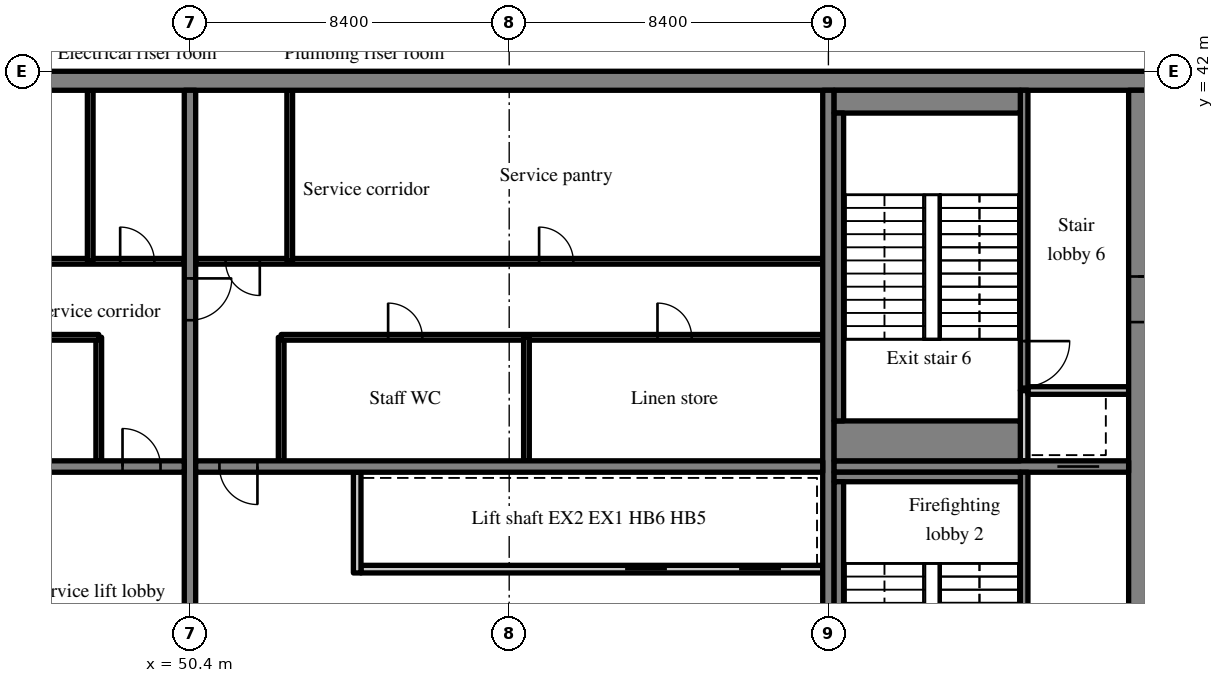
"""IFC4 building model, lengths in metres.
Left out: names, types, materials, properties, quantities, classifications, styles, units other than length and angle.
Written with IfcOpenShell. Run it as: python <this file> out.ifc"""

import sys

from ifc_helpers import new_model, si_unit, direction, frame, frame_2d, origin, place, context, subcontext, project, spatial, rectangle, extrude, source, transform, mapped, element, fill, save


model = new_model("IFC4")
c1 = context("Model", 3, precision=1e-05, world=origin(), true_north=direction((0.0, 1.0)))
c2 = subcontext(c1, "Body", "Model", "MODEL_VIEW")
j1 = project(units=[si_unit("LENGTHUNIT", "METRE"), si_unit("PLANEANGLEUNIT", "RADIAN")], contexts=[c1])
p1 = place(None, origin())
s1 = spatial("IfcSite", under=j1, at=p1, CompositionType="ELEMENT")
p2 = place(p1, origin())
s2 = spatial("IfcBuilding", under=s1, at=p2, CompositionType="ELEMENT")
p3 = place(p2, frame((0.0, 0.0, 281.7)))
s3 = spatial("IfcBuildingStorey", under=s2, at=p3, CompositionType="ELEMENT", Elevation=281.7)
m1 = source(origin(), c2, "Body", "SweptSolid", [
    extrude(rectangle(XDim=50.4, YDim=0.5, at=frame_2d((25.2, 0.0))), origin(), (0.0, 0.0, 1.0), 3.72),
])
p4 = place(p3, frame((25.2, 41.75, 0.0), z_axis=(0.0, 0.0, 1.0), x_axis=(1.0, 0.0, 0.0)))
e1 = element("IfcWall", 1, at=p4, inside=s3, PredefinedType="SHEAR", context=c2, shape_type="MappedRepresentation", body=[
    mapped(m1, transform((0.0, 0.0, 0.0), scale=1.0)),
])
m2 = source(origin(), c2, "Body", "SweptSolid", [
    extrude(rectangle(XDim=19.0, YDim=0.5, at=frame_2d((9.5, 0.0))), origin(), (0.0, 0.0, 1.0), 3.72),
])
p5 = place(p3, frame((75.35, 22.5, 0.0), z_axis=(0.0, 0.0, 1.0), x_axis=(0.0, 1.0, 0.0)))
e2 = element("IfcWall", 2, at=p5, inside=s3, PredefinedType="SHEAR", context=c2, shape_type="MappedRepresentation", body=[
    mapped(m2, transform((0.0, 0.0, 0.0), scale=1.0)),
])
m3 = source(origin(), c2, "Body", "SweptSolid", [
    extrude(rectangle(XDim=1.2, YDim=2.1, at=frame_2d((0.6, 1.05))), frame((0.0, 0.26, 0.0), z_axis=(0.0, -1.0, 0.0), x_axis=(1.0, 0.0, 0.0)), (0.0, 0.0, 1.0), 0.52),
])
p6 = place(p5, frame((12.9, 0.0, 0.0)))
e3 = element("IfcOpeningElement", 3, at=p6, cuts=e2, PredefinedType="OPENING", context=c2, shape_type="MappedRepresentation", body=[
    mapped(m3, transform((0.0, 0.0, 0.0), scale=1.0)),
])
m4 = source(origin(), c2, "Body", "SweptSolid", [
    extrude(rectangle(XDim=19.0, YDim=0.3, at=frame_2d((9.5, 0.0))), origin(), (0.0, 0.0, 1.0), 3.72),
])
p7 = place(p3, frame((50.4, 22.5, 0.0), z_axis=(0.0, 0.0, 1.0), x_axis=(0.0, 1.0, 0.0)))
e4 = element("IfcWall", 4, at=p7, inside=s3, PredefinedType="SHEAR", context=c2, shape_type="MappedRepresentation", body=[
    mapped(m4, transform((0.0, 0.0, 0.0), scale=1.0)),
])
m5 = source(origin(), c2, "Body", "SweptSolid", [
    extrude(rectangle(XDim=1.1, YDim=2.1, at=frame_2d((0.55, 1.05))), frame((0.0, 0.16, 0.0), z_axis=(0.0, -1.0, 0.0), x_axis=(1.0, 0.0, 0.0)), (0.0, 0.0, 1.0), 0.32),
])
p8 = place(p7, frame((12.95, 0.0, 0.0)))
e5 = element("IfcOpeningElement", 5, at=p8, cuts=e4, PredefinedType="OPENING", context=c2, shape_type="MappedRepresentation", body=[
    mapped(m5, transform((0.0, 0.0, 0.0), scale=1.0)),
])
p9 = place(p3, frame((67.2, 22.5, 0.0), z_axis=(0.0, 0.0, 1.0), x_axis=(0.0, 1.0, 0.0)))
e6 = element("IfcWall", 6, at=p9, inside=s3, PredefinedType="SHEAR", context=c2, shape_type="MappedRepresentation", body=[
    mapped(m4, transform((0.0, 0.0, 0.0), scale=1.0)),
])
m6 = source(origin(), c2, "Body", "SweptSolid", [
    extrude(rectangle(XDim=16.5, YDim=0.3, at=frame_2d((8.25, 0.0))), origin(), (0.0, 0.0, 1.0), 3.72),
])
p10 = place(p3, frame((33.75, 31.6, 0.0), z_axis=(0.0, 0.0, 1.0), x_axis=(1.0, 0.0, 0.0)))
e7 = element("IfcWall", 7, at=p10, inside=s3, PredefinedType="SHEAR", context=c2, shape_type="MappedRepresentation", body=[
    mapped(m6, transform((0.0, 0.0, 0.0), scale=1.0)),
])
m7 = source(origin(), c2, "Body", "SweptSolid", [
    extrude(rectangle(XDim=1.0, YDim=2.1, at=frame_2d((0.5, 1.05))), frame((0.0, 0.16, 0.0), z_axis=(0.0, -1.0, 0.0), x_axis=(1.0, 0.0, 0.0)), (0.0, 0.0, 1.0), 0.32),
])
p11 = place(p10, frame((14.875, 0.0, 0.0)))
e8 = element("IfcOpeningElement", 8, at=p11, cuts=e7, PredefinedType="OPENING", context=c2, shape_type="MappedRepresentation", body=[
    mapped(m7, transform((0.0, 0.0, 0.0), scale=1.0)),
])
p12 = place(p3, frame((50.55, 31.6, 0.0), z_axis=(0.0, 0.0, 1.0), x_axis=(1.0, 0.0, 0.0)))
e9 = element("IfcWall", 9, at=p12, inside=s3, PredefinedType="SHEAR", context=c2, shape_type="MappedRepresentation", body=[
    mapped(m6, transform((0.0, 0.0, 0.0), scale=1.0)),
])
p13 = place(p12, frame((0.625, 0.0, 0.0)))
e10 = element("IfcOpeningElement", 10, at=p13, cuts=e9, PredefinedType="OPENING", context=c2, shape_type="MappedRepresentation", body=[
    mapped(m7, transform((0.0, 0.0, 0.0), scale=1.0)),
])
m8 = source(origin(), c2, "Body", "SweptSolid", [
    extrude(rectangle(XDim=7.75, YDim=0.3, at=frame_2d((3.875, 0.0))), origin(), (0.0, 0.0, 1.0), 3.72),
])
p14 = place(p3, frame((67.35, 31.6, 0.0), z_axis=(0.0, 0.0, 1.0), x_axis=(1.0, 0.0, 0.0)))
e11 = element("IfcWall", 11, at=p14, inside=s3, PredefinedType="SHEAR", context=c2, shape_type="MappedRepresentation", body=[
    mapped(m8, transform((0.0, 0.0, 0.0), scale=1.0)),
])
p15 = place(p14, frame((5.875, 0.0, 0.0)))
e12 = element("IfcOpeningElement", 12, at=p15, cuts=e11, PredefinedType="OPENING", context=c2, shape_type="MappedRepresentation", body=[
    mapped(m5, transform((0.0, 0.0, 0.0), scale=1.0)),
])
m9 = source(origin(), c2, "Body", "SweptSolid", [
    extrude(rectangle(XDim=3.559, YDim=0.3, at=frame_2d((1.78, 0.0))), origin(), (0.0, 0.0, 1.0), 3.72),
])
p16 = place(p3, frame((76.523, 43.292, 0.0), z_axis=(0.0, 0.0, 1.0), x_axis=(-0.35779745313, -0.933799219604, 0.0)))
e13 = element("IfcWall", 13, at=p16, inside=s3, PredefinedType="SOLIDWALL", context=c2, shape_type="MappedRepresentation", body=[
    mapped(m9, transform((0.0, 0.0, 0.0), scale=1.0)),
])
m10 = source(origin(), c2, "Body", "SweptSolid", [
    extrude(rectangle(XDim=1.5, YDim=2.0, at=frame_2d((0.75, 1.0))), frame((0.0, 0.16, 0.0), z_axis=(0.0, -1.0, 0.0), x_axis=(1.0, 0.0, 0.0)), (0.0, 0.0, 1.0), 0.32),
])
p17 = place(p16, frame((0.156, 0.0, 0.9)))
e14 = element("IfcOpeningElement", 14, at=p17, cuts=e13, PredefinedType="OPENING", context=c2, shape_type="MappedRepresentation", body=[
    mapped(m10, transform((0.0, 0.0, 0.0), scale=1.0)),
])
m11 = source(origin(), c2, "Body", "SweptSolid", [
    extrude(rectangle(XDim=3.25, YDim=0.15, at=frame_2d((1.625, 0.0))), origin(), (0.0, 0.0, 1.0), 3.72),
])
p18 = place(p3, frame((48.0, 31.75, 0.0), z_axis=(0.0, 0.0, 1.0), x_axis=(0.0, 1.0, 0.0)))
e15 = element("IfcWall", 15, at=p18, inside=s3, PredefinedType="PARTITIONING", context=c2, shape_type="MappedRepresentation", body=[
    mapped(m11, transform((0.0, 0.0, 0.0), scale=1.0)),
])
m12 = source(origin(), c2, "Body", "SweptSolid", [
    extrude(rectangle(XDim=14.25, YDim=0.15, at=frame_2d((7.125, 0.0))), origin(), (0.0, 0.0, 1.0), 3.72),
])
p19 = place(p3, frame((33.75, 35.0, 0.0), z_axis=(0.0, 0.0, 1.0), x_axis=(1.0, 0.0, 0.0)))
e16 = element("IfcWall", 16, at=p19, inside=s3, PredefinedType="PARTITIONING", context=c2, shape_type="MappedRepresentation", body=[
    mapped(m12, transform((0.0, 0.0, 0.0), scale=1.0)),
])
m13 = source(origin(), c2, "Body", "SweptSolid", [
    extrude(rectangle(XDim=0.9, YDim=2.1, at=frame_2d((0.45, 1.05))), frame((0.0, 0.085, 0.0), z_axis=(0.0, -1.0, 0.0), x_axis=(1.0, 0.0, 0.0)), (0.0, 0.0, 1.0), 0.17),
])
p20 = place(p19, frame((6.637, 0.0, 0.0)))
e17 = element("IfcOpeningElement", 17, at=p20, cuts=e16, PredefinedType="OPENING", context=c2, shape_type="MappedRepresentation", body=[
    mapped(m13, transform((0.0, 0.0, 0.0), scale=1.0)),
])
m14 = source(origin(), c2, "Body", "SweptSolid", [
    extrude(rectangle(XDim=16.5, YDim=0.15, at=frame_2d((8.25, 0.0))), origin(), (0.0, 0.0, 1.0), 3.72),
])
p21 = place(p3, frame((33.75, 37.0, 0.0), z_axis=(0.0, 0.0, 1.0), x_axis=(1.0, 0.0, 0.0)))
e18 = element("IfcWall", 18, at=p21, inside=s3, PredefinedType="PARTITIONING", context=c2, shape_type="MappedRepresentation", body=[
    mapped(m14, transform((0.0, 0.0, 0.0), scale=1.0)),
])
p22 = place(p21, frame((0.787, 0.0, 0.0)))
e19 = element("IfcOpeningElement", 19, at=p22, cuts=e18, PredefinedType="OPENING", context=c2, shape_type="MappedRepresentation", body=[
    mapped(m13, transform((0.0, 0.0, 0.0), scale=1.0)),
])
p23 = place(p21, frame((3.675, 0.0, 0.0)))
e20 = element("IfcOpeningElement", 20, at=p23, cuts=e18, PredefinedType="OPENING", context=c2, shape_type="MappedRepresentation", body=[
    mapped(m13, transform((0.0, 0.0, 0.0), scale=1.0)),
])
p24 = place(p21, frame((9.45, 0.0, 0.0)))
e21 = element("IfcOpeningElement", 21, at=p24, cuts=e18, PredefinedType="OPENING", context=c2, shape_type="MappedRepresentation", body=[
    mapped(m13, transform((0.0, 0.0, 0.0), scale=1.0)),
])
p25 = place(p21, frame((14.813, 0.0, 0.0)))
e22 = element("IfcOpeningElement", 22, at=p25, cuts=e18, PredefinedType="OPENING", context=c2, shape_type="MappedRepresentation", body=[
    mapped(m13, transform((0.0, 0.0, 0.0), scale=1.0)),
])
m15 = source(origin(), c2, "Body", "SweptSolid", [
    extrude(rectangle(XDim=4.5, YDim=0.15, at=frame_2d((2.25, 0.0))), origin(), (0.0, 0.0, 1.0), 3.72),
])
p26 = place(p3, frame((47.775, 37.0, 0.0), z_axis=(0.0, 0.0, 1.0), x_axis=(0.0, 1.0, 0.0)))
e23 = element("IfcWall", 23, at=p26, inside=s3, PredefinedType="PARTITIONING", context=c2, shape_type="MappedRepresentation", body=[
    mapped(m15, transform((0.0, 0.0, 0.0), scale=1.0)),
])
m16 = source(origin(), c2, "Body", "SweptSolid", [
    extrude(rectangle(XDim=12.15, YDim=0.2, at=frame_2d((6.075, 0.0))), origin(), (0.0, 0.0, 1.0), 3.72),
])
p27 = place(p3, frame((67.05, 28.9, 0.0), z_axis=(0.0, 0.0, 1.0), x_axis=(-1.0, 0.0, 0.0)))
e24 = element("IfcWall", 24, at=p27, inside=s3, PredefinedType="SOLIDWALL", context=c2, shape_type="MappedRepresentation", body=[
    mapped(m16, transform((0.0, 0.0, 0.0), scale=1.0)),
])
m17 = source(origin(), c2, "Body", "SweptSolid", [
    extrude(rectangle(XDim=1.1, YDim=2.1, at=frame_2d((0.55, 1.05))), frame((0.0, 0.11, 0.0), z_axis=(0.0, -1.0, 0.0), x_axis=(1.0, 0.0, 0.0)), (0.0, 0.0, 1.0), 0.22),
])
p28 = place(p27, frame((1.1, 0.0, 0.0)))
e25 = element("IfcOpeningElement", 25, at=p28, cuts=e24, PredefinedType="OPENING", context=c2, shape_type="MappedRepresentation", body=[
    mapped(m17, transform((0.0, 0.0, 0.0), scale=1.0)),
])
p29 = place(p27, frame((4.1, 0.0, 0.0)))
e26 = element("IfcOpeningElement", 26, at=p29, cuts=e24, PredefinedType="OPENING", context=c2, shape_type="MappedRepresentation", body=[
    mapped(m17, transform((0.0, 0.0, 0.0), scale=1.0)),
])
m18 = source(origin(), c2, "Body", "SweptSolid", [
    extrude(rectangle(XDim=2.65, YDim=0.2, at=frame_2d((1.325, 0.0))), origin(), (0.0, 0.0, 1.0), 3.72),
])
p30 = place(p3, frame((54.8, 28.8, 0.0), z_axis=(0.0, 0.0, 1.0), x_axis=(0.0, 1.0, 0.0)))
e27 = element("IfcWall", 27, at=p30, inside=s3, PredefinedType="SOLIDWALL", context=c2, shape_type="MappedRepresentation", body=[
    mapped(m18, transform((0.0, 0.0, 0.0), scale=1.0)),
])
p31 = place(p3, frame((52.8, 31.75, 0.0), z_axis=(0.0, 0.0, 1.0), x_axis=(0.0, 1.0, 0.0)))
e28 = element("IfcWall", 28, at=p31, inside=s3, PredefinedType="PARTITIONING", context=c2, shape_type="MappedRepresentation", body=[
    mapped(m11, transform((0.0, 0.0, 0.0), scale=1.0)),
])
p32 = place(p3, frame((67.05, 35.0, 0.0), z_axis=(0.0, 0.0, 1.0), x_axis=(-1.0, 0.0, 0.0)))
e29 = element("IfcWall", 29, at=p32, inside=s3, PredefinedType="PARTITIONING", context=c2, shape_type="MappedRepresentation", body=[
    mapped(m12, transform((0.0, 0.0, 0.0), scale=1.0)),
])
p33 = place(p32, frame((3.448, 0.0, 0.0)))
e30 = element("IfcOpeningElement", 30, at=p33, cuts=e29, PredefinedType="OPENING", context=c2, shape_type="MappedRepresentation", body=[
    mapped(m13, transform((0.0, 0.0, 0.0), scale=1.0)),
])
p34 = place(p32, frame((10.536, 0.0, 0.0)))
e31 = element("IfcOpeningElement", 31, at=p34, cuts=e29, PredefinedType="OPENING", context=c2, shape_type="MappedRepresentation", body=[
    mapped(m13, transform((0.0, 0.0, 0.0), scale=1.0)),
])
p35 = place(p3, frame((67.05, 37.0, 0.0), z_axis=(0.0, 0.0, 1.0), x_axis=(-1.0, 0.0, 0.0)))
e32 = element("IfcWall", 32, at=p35, inside=s3, PredefinedType="PARTITIONING", context=c2, shape_type="MappedRepresentation", body=[
    mapped(m14, transform((0.0, 0.0, 0.0), scale=1.0)),
])
p36 = place(p35, frame((6.563, 0.0, 0.0)))
e33 = element("IfcOpeningElement", 33, at=p36, cuts=e32, PredefinedType="OPENING", context=c2, shape_type="MappedRepresentation", body=[
    mapped(m13, transform((0.0, 0.0, 0.0), scale=1.0)),
])
p37 = place(p35, frame((14.813, 0.0, 0.0)))
e34 = element("IfcOpeningElement", 34, at=p37, cuts=e32, PredefinedType="OPENING", context=c2, shape_type="MappedRepresentation", body=[
    mapped(m13, transform((0.0, 0.0, 0.0), scale=1.0)),
])
p38 = place(p3, frame((59.254, 31.75, 0.0), z_axis=(0.0, 0.0, 1.0), x_axis=(0.0, 1.0, 0.0)))
e35 = element("IfcWall", 35, at=p38, inside=s3, PredefinedType="PARTITIONING", context=c2, shape_type="MappedRepresentation", body=[
    mapped(m11, transform((0.0, 0.0, 0.0), scale=1.0)),
])
p39 = place(p3, frame((53.025, 37.0, 0.0), z_axis=(0.0, 0.0, 1.0), x_axis=(0.0, 1.0, 0.0)))
e36 = element("IfcWall", 36, at=p39, inside=s3, PredefinedType="PARTITIONING", context=c2, shape_type="MappedRepresentation", body=[
    mapped(m15, transform((0.0, 0.0, 0.0), scale=1.0)),
])
m19 = source(origin(), c2, "Body", "SweptSolid", [
    extrude(rectangle(XDim=8.95, YDim=0.2, at=frame_2d((4.475, 0.0))), origin(), (0.0, 0.0, 1.0), 3.72),
])
p40 = place(p3, frame((72.35, 22.5, 0.0), z_axis=(0.0, 0.0, 1.0), x_axis=(0.0, 1.0, 0.0)))
e37 = element("IfcWall", 37, at=p40, inside=s3, PredefinedType="SOLIDWALL", context=c2, shape_type="MappedRepresentation", body=[
    mapped(m19, transform((0.0, 0.0, 0.0), scale=1.0)),
])
m20 = source(origin(), c2, "Body", "SweptSolid", [
    extrude(rectangle(XDim=1.2, YDim=2.1, at=frame_2d((0.6, 1.05))), frame((0.0, 0.11, 0.0), z_axis=(0.0, -1.0, 0.0), x_axis=(1.0, 0.0, 0.0)), (0.0, 0.0, 1.0), 0.22),
])
p41 = place(p40, frame((1.1, 0.0, 0.0)))
e38 = element("IfcOpeningElement", 38, at=p41, cuts=e37, PredefinedType="OPENING", context=c2, shape_type="MappedRepresentation", body=[
    mapped(m20, transform((0.0, 0.0, 0.0), scale=1.0)),
])
m21 = source(origin(), c2, "Body", "SweptSolid", [
    extrude(rectangle(XDim=1.85, YDim=0.2, at=frame_2d((0.925, 0.0))), origin(), (0.0, 0.0, 1.0), 3.72),
])
p42 = place(p3, frame((72.35, 31.75, 0.0), z_axis=(0.0, 0.0, 1.0), x_axis=(0.0, 1.0, 0.0)))
e39 = element("IfcWall", 39, at=p42, inside=s3, PredefinedType="SOLIDWALL", context=c2, shape_type="MappedRepresentation", body=[
    mapped(m21, transform((0.0, 0.0, 0.0), scale=1.0)),
])
m22 = source(origin(), c2, "Body", "SweptSolid", [
    extrude(rectangle(XDim=2.65, YDim=0.2, at=frame_2d((1.325, 0.0))), origin(), (0.0, 0.0, 1.0), 3.72),
])
p43 = place(p3, frame((72.45, 33.6, 0.0), z_axis=(0.0, 0.0, 1.0), x_axis=(1.0, 0.0, 0.0)))
e40 = element("IfcWall", 40, at=p43, inside=s3, PredefinedType="SOLIDWALL", context=c2, shape_type="MappedRepresentation", body=[
    mapped(m22, transform((0.0, 0.0, 0.0), scale=1.0)),
])
m23 = source(origin(), c2, "Body", "SweptSolid", [
    extrude(rectangle(XDim=7.9, YDim=0.2, at=frame_2d((3.95, 0.0))), origin(), (0.0, 0.0, 1.0), 3.72),
])
p44 = place(p3, frame((72.35, 33.6, 0.0), z_axis=(0.0, 0.0, 1.0), x_axis=(0.0, 1.0, 0.0)))
e41 = element("IfcWall", 41, at=p44, inside=s3, PredefinedType="SOLIDWALL", context=c2, shape_type="MappedRepresentation", body=[
    mapped(m23, transform((0.0, 0.0, 0.0), scale=1.0)),
])
p45 = place(p44, frame((0.1, 0.0, 0.0)))
e42 = element("IfcOpeningElement", 42, at=p45, cuts=e41, PredefinedType="OPENING", context=c2, shape_type="MappedRepresentation", body=[
    mapped(m20, transform((0.0, 0.0, 0.0), scale=1.0)),
])
m24 = source(origin(), c2, "Body", "SweptSolid", [
    extrude(rectangle(XDim=4.9, YDim=0.25, at=frame_2d((2.45, 0.0))), origin(), (0.0, 0.0, 1.0), 3.72),
])
p46 = place(p3, frame((67.35, 31.325, 0.0), z_axis=(0.0, 0.0, 1.0), x_axis=(1.0, 0.0, 0.0)))
e43 = element("IfcWall", 43, at=p46, inside=s3, PredefinedType="SOLIDWALL", context=c2, shape_type="MappedRepresentation", body=[
    mapped(m24, transform((0.0, 0.0, 0.0), scale=1.0)),
])
m25 = source(origin(), c2, "Body", "SweptSolid", [
    extrude(rectangle(XDim=8.1, YDim=0.25, at=frame_2d((4.05, 0.0))), origin(), (0.0, 0.0, 1.0), 3.72),
])
p47 = place(p3, frame((67.475, 23.1, 0.0), z_axis=(0.0, 0.0, 1.0), x_axis=(0.0, 1.0, 0.0)))
e44 = element("IfcWall", 44, at=p47, inside=s3, PredefinedType="SOLIDWALL", context=c2, shape_type="MappedRepresentation", body=[
    mapped(m25, transform((0.0, 0.0, 0.0), scale=1.0)),
])
m26 = source(origin(), c2, "Body", "SweptSolid", [
    extrude(rectangle(XDim=4.9, YDim=0.6, at=frame_2d((2.45, 0.0))), origin(), (0.0, 0.0, 1.0), 3.72),
])
p48 = place(p3, frame((67.35, 41.2, 0.0), z_axis=(0.0, 0.0, 1.0), x_axis=(1.0, 0.0, 0.0)))
e45 = element("IfcWall", 45, at=p48, inside=s3, PredefinedType="SOLIDWALL", context=c2, shape_type="MappedRepresentation", body=[
    mapped(m26, transform((0.0, 0.0, 0.0), scale=1.0)),
])
m27 = source(origin(), c2, "Body", "SweptSolid", [
    extrude(rectangle(XDim=4.9, YDim=1.05, at=frame_2d((2.45, 0.0))), origin(), (0.0, 0.0, 1.0), 3.72),
])
p49 = place(p3, frame((67.35, 32.275, 0.0), z_axis=(0.0, 0.0, 1.0), x_axis=(1.0, 0.0, 0.0)))
e46 = element("IfcWall", 46, at=p49, inside=s3, PredefinedType="SOLIDWALL", context=c2, shape_type="MappedRepresentation", body=[
    mapped(m27, transform((0.0, 0.0, 0.0), scale=1.0)),
])
p50 = place(p3, frame((67.475, 32.8, 0.0), z_axis=(0.0, 0.0, 1.0), x_axis=(0.0, 1.0, 0.0)))
e47 = element("IfcWall", 47, at=p50, inside=s3, PredefinedType="SOLIDWALL", context=c2, shape_type="MappedRepresentation", body=[
    mapped(m25, transform((0.0, 0.0, 0.0), scale=1.0)),
])
m28 = source(origin(), c2, "Body", "SweptSolid", [
    extrude(rectangle(XDim=1.0, YDim=2.1, at=frame_2d((0.5, 1.05))), frame((0.0, 0.025, 0.0), z_axis=(0.0, -1.0, 0.0), x_axis=(1.0, 0.0, 0.0)), (0.0, 0.0, 1.0), 0.05),
])
p51 = place(p11, origin())
e48 = element("IfcDoor", 48, at=p51, inside=s3, OperationType="SINGLE_SWING_LEFT", PredefinedType="DOOR", context=c2, shape_type="MappedRepresentation", body=[
    mapped(m28, transform((0.0, 0.0, 0.0), scale=1.0)),
])
fill(e8, e48)
m29 = source(origin(), c2, "Body", "SweptSolid", [
    extrude(rectangle(XDim=0.9, YDim=2.1, at=frame_2d((0.45, 1.05))), frame((0.0, 0.025, 0.0), z_axis=(0.0, -1.0, 0.0), x_axis=(1.0, 0.0, 0.0)), (0.0, 0.0, 1.0), 0.05),
])
p52 = place(p25, origin())
e49 = element("IfcDoor", 49, at=p52, inside=s3, OperationType="SINGLE_SWING_LEFT", PredefinedType="DOOR", context=c2, shape_type="MappedRepresentation", body=[
    mapped(m29, transform((0.0, 0.0, 0.0), scale=1.0)),
])
fill(e22, e49)
p53 = place(p13, origin())
e50 = element("IfcDoor", 50, at=p53, inside=s3, OperationType="SINGLE_SWING_RIGHT", PredefinedType="DOOR", context=c2, shape_type="MappedRepresentation", body=[
    mapped(m28, transform((0.0, 0.0, 0.0), scale=1.0)),
])
fill(e10, e50)
m30 = source(origin(), c2, "Body", "SweptSolid", [
    extrude(rectangle(XDim=1.1, YDim=2.1, at=frame_2d((0.55, 1.05))), frame((0.0, 0.025, 0.0), z_axis=(0.0, -1.0, 0.0), x_axis=(1.0, 0.0, 0.0)), (0.0, 0.0, 1.0), 0.05),
])
p54 = place(p28, origin())
e51 = element("IfcDoor", 51, at=p54, inside=s3, OperationType="SLIDING_TO_RIGHT", PredefinedType="DOOR", context=c2, shape_type="MappedRepresentation", body=[
    mapped(m30, transform((0.0, 0.0, 0.0), scale=1.0)),
])
fill(e25, e51)
p55 = place(p29, origin())
e52 = element("IfcDoor", 52, at=p55, inside=s3, OperationType="SLIDING_TO_LEFT", PredefinedType="DOOR", context=c2, shape_type="MappedRepresentation", body=[
    mapped(m30, transform((0.0, 0.0, 0.0), scale=1.0)),
])
fill(e26, e52)
p56 = place(p33, origin())
e53 = element("IfcDoor", 53, at=p56, inside=s3, OperationType="SINGLE_SWING_RIGHT", PredefinedType="DOOR", context=c2, shape_type="MappedRepresentation", body=[
    mapped(m29, transform((0.0, 0.0, 0.0), scale=1.0)),
])
fill(e30, e53)
p57 = place(p34, origin())
e54 = element("IfcDoor", 54, at=p57, inside=s3, OperationType="SINGLE_SWING_RIGHT", PredefinedType="DOOR", context=c2, shape_type="MappedRepresentation", body=[
    mapped(m29, transform((0.0, 0.0, 0.0), scale=1.0)),
])
fill(e31, e54)
p58 = place(p36, origin())
e55 = element("IfcDoor", 55, at=p58, inside=s3, OperationType="SINGLE_SWING_RIGHT", PredefinedType="DOOR", context=c2, shape_type="MappedRepresentation", body=[
    mapped(m29, transform((0.0, 0.0, 0.0), scale=1.0)),
])
fill(e33, e55)
p59 = place(p37, origin())
e56 = element("IfcDoor", 56, at=p59, inside=s3, OperationType="SINGLE_SWING_LEFT", PredefinedType="DOOR", context=c2, shape_type="MappedRepresentation", body=[
    mapped(m29, transform((0.0, 0.0, 0.0), scale=1.0)),
])
fill(e34, e56)
p60 = place(p15, origin())
e57 = element("IfcDoor", 57, at=p60, inside=s3, OperationType="SLIDING_TO_RIGHT", PredefinedType="DOOR", context=c2, shape_type="MappedRepresentation", body=[
    mapped(m30, transform((0.0, 0.0, 0.0), scale=1.0)),
])
fill(e12, e57)
m31 = source(origin(), c2, "Body", "SweptSolid", [
    extrude(rectangle(XDim=1.2, YDim=2.1, at=frame_2d((0.6, 1.05))), frame((0.0, 0.025, 0.0), z_axis=(0.0, -1.0, 0.0), x_axis=(1.0, 0.0, 0.0)), (0.0, 0.0, 1.0), 0.05),
])
p61 = place(p45, origin())
e58 = element("IfcDoor", 58, at=p61, inside=s3, OperationType="SINGLE_SWING_RIGHT", PredefinedType="DOOR", context=c2, shape_type="MappedRepresentation", body=[
    mapped(m31, transform((0.0, 0.0, 0.0), scale=1.0)),
])
fill(e42, e58)
p62 = place(p6, origin())
e59 = element("IfcDoor", 59, at=p62, inside=s3, OperationType="SINGLE_SWING_RIGHT", PredefinedType="DOOR", context=c2, shape_type="MappedRepresentation", body=[
    mapped(m31, transform((0.0, 0.0, 0.0), scale=1.0)),
])
fill(e3, e59)
p63 = place(p8, origin())
e60 = element("IfcDoor", 60, at=p63, inside=s3, OperationType="SINGLE_SWING_RIGHT", PredefinedType="DOOR", context=c2, shape_type="MappedRepresentation", body=[
    mapped(m30, transform((0.0, 0.0, 0.0), scale=1.0)),
])
fill(e5, e60)
save(model, sys.argv[1])
